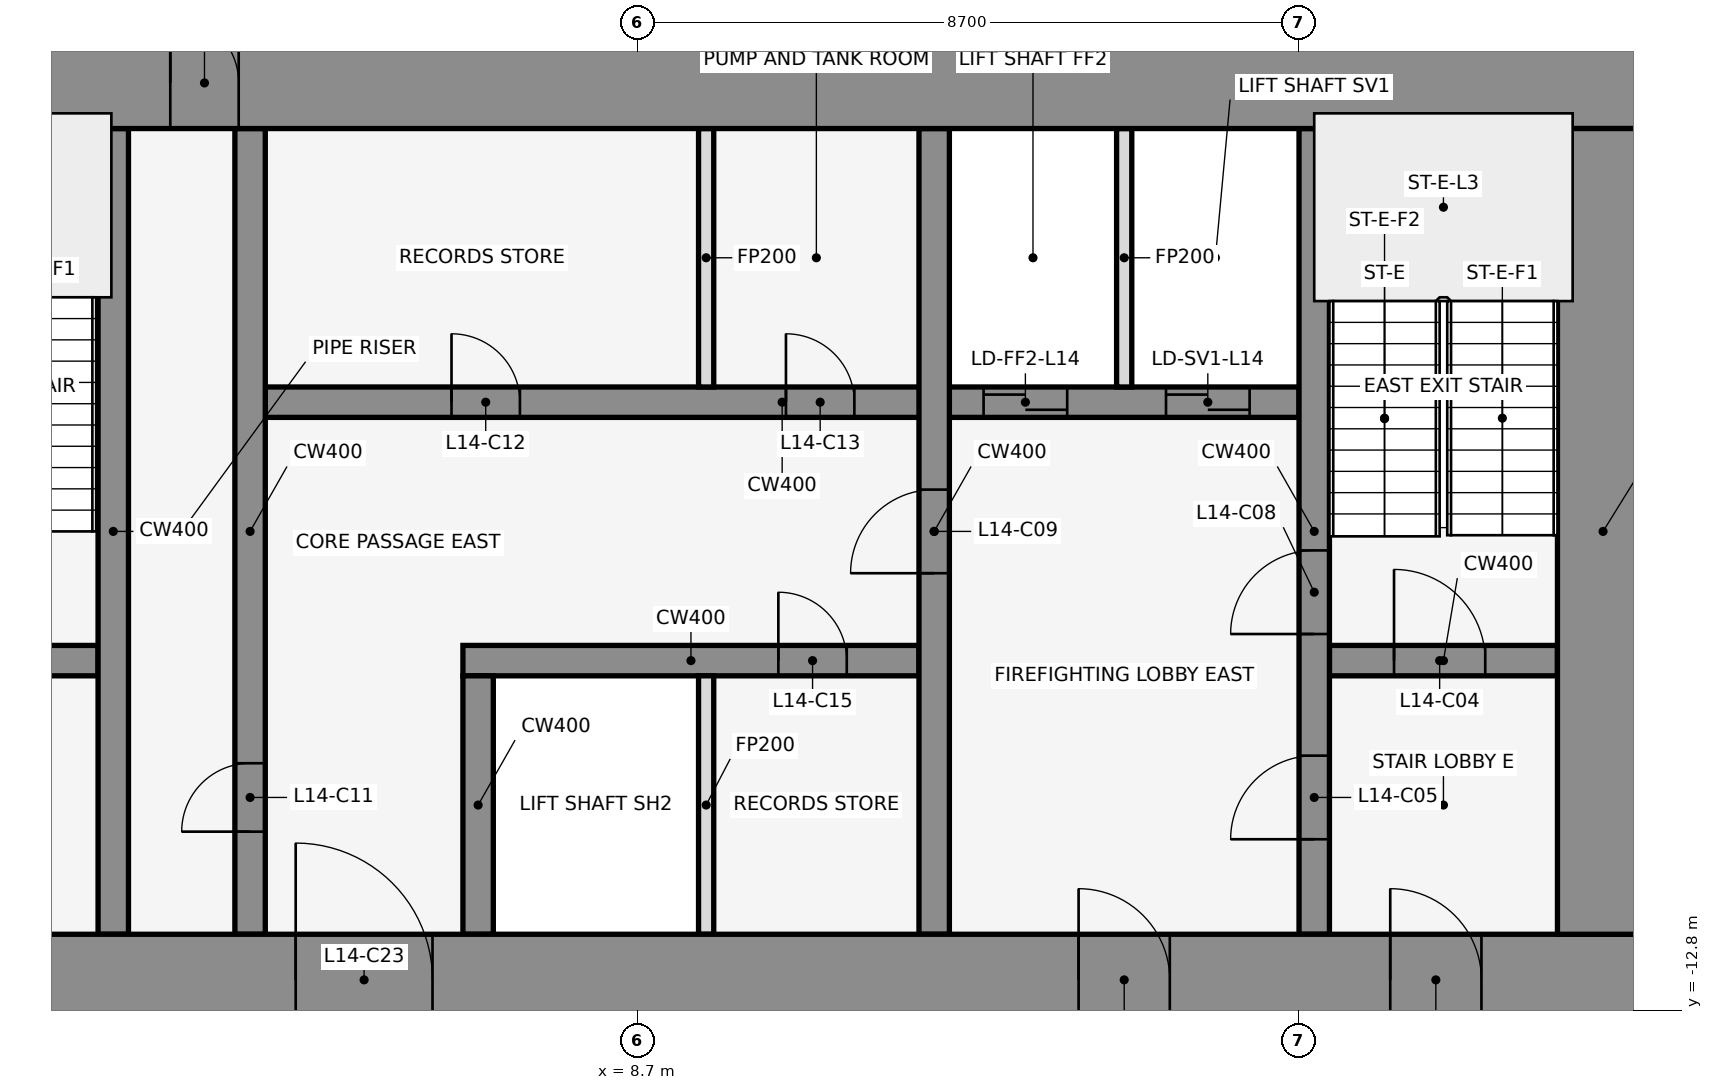
"""IFC4 building model, lengths in metres.
Left out: names, types, materials, properties, quantities, classifications, styles, units other than length and angle.
Written with IfcOpenShell. Run it as: python <this file> out.ifc"""

import sys

from ifc_helpers import new_model, si_unit, direction, frame, frame_2d, origin, place, context, subcontext, project, spatial, rectangle, extrude, element, fill, save


model = new_model("IFC4")
c1 = context("Model", 3, precision=1e-05, world=origin(), true_north=direction((0.0, 1.0)))
c2 = subcontext(c1, "Body", "Model", "MODEL_VIEW")
j1 = project(units=[si_unit("LENGTHUNIT", "METRE"), si_unit("PLANEANGLEUNIT", "RADIAN")], contexts=[c1])
p1 = place(None, origin())
s1 = spatial("IfcSite", under=j1, at=p1, CompositionType="ELEMENT")
p2 = place(p1, origin())
s2 = spatial("IfcBuilding", under=s1, at=p2, CompositionType="ELEMENT")
p3 = place(p2, frame((0.0, 0.0, 71.0)))
s3 = spatial("IfcBuildingStorey", under=s2, at=p3, CompositionType="ELEMENT", Elevation=71.0)
for number, where, z_axis, x_axis in (
    (1, (16.432, -0.105, 0.0), (0.0, 0.0, 1.0), (-0.84, 0.543, 0.0)),
    (2, (1.901, 1.08, 0.0), (0.0, 0.0, 1.0), (-0.84, -0.543, 0.0)),
):
    element("IfcWall", number, at=place(p3, frame(where, z_axis=z_axis, x_axis=x_axis)), inside=s3, PredefinedType="STANDARD", context=c2, shape_type="SweptSolid", body=[
        extrude(rectangle(XDim=2.183, YDim=0.25, at=frame_2d((1.091, 0.0))), origin(), (0.0, 0.0, 1.0), 4.35),
    ])
p4 = place(p3, frame((-1.6, -8.2, 0.0), z_axis=(0.0, 0.0, 1.0), x_axis=(1.0, 0.0, 0.0)))
e3 = element("IfcWall", 3, at=p4, inside=s3, PredefinedType="SHEAR", context=c2, shape_type="SweptSolid", body=[
    extrude(rectangle(XDim=3.2, YDim=0.4, at=frame_2d((1.6, 0.0))), origin(), (0.0, 0.0, 1.0), 4.5),
])
p5 = place(p4, frame((1.05, 0.0, 0.0)))
e4 = element("IfcOpeningElement", 4, at=p5, cuts=e3, PredefinedType="OPENING", context=c2, shape_type="SweptSolid", body=[
    extrude(rectangle(XDim=1.2, YDim=2.1, at=frame_2d((0.6, 1.05))), frame((0.0, 0.212, 0.0), z_axis=(0.0, -1.0, 0.0), x_axis=(1.0, 0.0, 0.0)), (0.0, 0.0, 1.0), 0.424),
])
p6 = place(p3, frame((6.4, -8.2, 0.0), z_axis=(0.0, 0.0, 1.0), x_axis=(1.0, 0.0, 0.0)))
e5 = element("IfcWall", 5, at=p6, inside=s3, PredefinedType="SHEAR", context=c2, shape_type="SweptSolid", body=[
    extrude(rectangle(XDim=6.0, YDim=0.4, at=frame_2d((3.0, 0.0))), origin(), (0.0, 0.0, 1.0), 4.5),
])
p7 = place(p6, frame((4.15, 0.0, 0.0)))
e6 = element("IfcOpeningElement", 6, at=p7, cuts=e5, PredefinedType="OPENING", context=c2, shape_type="SweptSolid", body=[
    extrude(rectangle(XDim=0.9, YDim=2.1, at=frame_2d((0.45, 1.05))), frame((0.0, 0.212, 0.0), z_axis=(0.0, -1.0, 0.0), x_axis=(1.0, 0.0, 0.0)), (0.0, 0.0, 1.0), 0.424),
])
p8 = place(p3, frame((17.8, -8.2, 0.0), z_axis=(0.0, 0.0, 1.0), x_axis=(1.0, 0.0, 0.0)))
e7 = element("IfcWall", 7, at=p8, inside=s3, PredefinedType="SHEAR", context=c2, shape_type="SweptSolid", body=[
    extrude(rectangle(XDim=3.0, YDim=0.4, at=frame_2d((1.5, 0.0))), origin(), (0.0, 0.0, 1.0), 4.5),
])
p9 = place(p8, frame((0.85, 0.0, 0.0)))
e8 = element("IfcOpeningElement", 8, at=p9, cuts=e7, PredefinedType="OPENING", context=c2, shape_type="SweptSolid", body=[
    extrude(rectangle(XDim=1.2, YDim=2.1, at=frame_2d((0.6, 1.05))), frame((0.0, 0.212, 0.0), z_axis=(0.0, -1.0, 0.0), x_axis=(1.0, 0.0, 0.0)), (0.0, 0.0, 1.0), 0.424),
])
p10 = place(p3, frame((3.8, -4.8, 0.0), z_axis=(0.0, 0.0, 1.0), x_axis=(1.0, 0.0, 0.0)))
e9 = element("IfcWall", 9, at=p10, inside=s3, PredefinedType="SHEAR", context=c2, shape_type="SweptSolid", body=[
    extrude(rectangle(XDim=13.6, YDim=0.4, at=frame_2d((6.8, 0.0))), origin(), (0.0, 0.0, 1.0), 4.5),
])
p11 = place(p10, frame((9.45, 0.0, 0.0)))
e10 = element("IfcOpeningElement", 10, at=p11, cuts=e9, PredefinedType="OPENING", context=c2, shape_type="SweptSolid", body=[
    extrude(rectangle(XDim=1.1, YDim=2.1, at=frame_2d((0.55, 1.05))), frame((0.0, 0.212, 0.0), z_axis=(0.0, -1.0, 0.0), x_axis=(1.0, 0.0, 0.0)), (0.0, 0.0, 1.0), 0.424),
])
p12 = place(p10, frame((11.85, 0.0, 0.0)))
e11 = element("IfcOpeningElement", 11, at=p12, cuts=e9, PredefinedType="OPENING", context=c2, shape_type="SweptSolid", body=[
    extrude(rectangle(XDim=1.1, YDim=2.1, at=frame_2d((0.55, 1.05))), frame((0.0, 0.212, 0.0), z_axis=(0.0, -1.0, 0.0), x_axis=(1.0, 0.0, 0.0)), (0.0, 0.0, 1.0), 0.424),
])
p13 = place(p10, frame((2.45, 0.0, 0.0)))
e12 = element("IfcOpeningElement", 12, at=p13, cuts=e9, PredefinedType="OPENING", context=c2, shape_type="SweptSolid", body=[
    extrude(rectangle(XDim=0.9, YDim=2.1, at=frame_2d((0.45, 1.05))), frame((0.0, 0.212, 0.0), z_axis=(0.0, -1.0, 0.0), x_axis=(1.0, 0.0, 0.0)), (0.0, 0.0, 1.0), 0.424),
])
p14 = place(p10, frame((6.85, 0.0, 0.0)))
e13 = element("IfcOpeningElement", 13, at=p14, cuts=e9, PredefinedType="OPENING", context=c2, shape_type="SweptSolid", body=[
    extrude(rectangle(XDim=0.9, YDim=2.1, at=frame_2d((0.45, 1.05))), frame((0.0, 0.212, 0.0), z_axis=(0.0, -1.0, 0.0), x_axis=(1.0, 0.0, 0.0)), (0.0, 0.0, 1.0), 0.424),
])
p15 = place(p3, frame((1.8, -11.8, 0.0), z_axis=(0.0, 0.0, 1.0), x_axis=(0.0, 1.0, 0.0)))
e14 = element("IfcWall", 14, at=p15, inside=s3, PredefinedType="SHEAR", context=c2, shape_type="SweptSolid", body=[
    extrude(rectangle(XDim=10.6, YDim=0.4, at=frame_2d((5.3, 0.0))), origin(), (0.0, 0.0, 1.0), 4.5),
])
p16 = place(p3, frame((3.6, -11.8, 0.0), z_axis=(0.0, 0.0, 1.0), x_axis=(0.0, 1.0, 0.0)))
e15 = element("IfcWall", 15, at=p16, inside=s3, PredefinedType="SHEAR", context=c2, shape_type="SweptSolid", body=[
    extrude(rectangle(XDim=10.6, YDim=0.4, at=frame_2d((5.3, 0.0))), origin(), (0.0, 0.0, 1.0), 4.5),
])
p17 = place(p16, frame((1.35, 0.0, 0.0)))
e16 = element("IfcOpeningElement", 16, at=p17, cuts=e15, PredefinedType="OPENING", context=c2, shape_type="SweptSolid", body=[
    extrude(rectangle(XDim=0.9, YDim=2.1, at=frame_2d((0.45, 1.05))), frame((0.0, 0.212, 0.0), z_axis=(0.0, -1.0, 0.0), x_axis=(1.0, 0.0, 0.0)), (0.0, 0.0, 1.0), 0.424),
])
p18 = place(p3, frame((6.6, -11.8, 0.0), z_axis=(0.0, 0.0, 1.0), x_axis=(0.0, 1.0, 0.0)))
e17 = element("IfcWall", 17, at=p18, inside=s3, PredefinedType="SHEAR", context=c2, shape_type="SweptSolid", body=[
    extrude(rectangle(XDim=3.4, YDim=0.4, at=frame_2d((1.7, 0.0))), origin(), (0.0, 0.0, 1.0), 4.5),
])
for number, where, z_axis, x_axis in (
    (18, (9.6, -11.8, 0.0), (0.0, 0.0, 1.0), (0.0, 1.0, 0.0)),
    (19, (9.6, -4.6, 0.0), (0.0, 0.0, 1.0), (0.0, 1.0, 0.0)),
):
    element("IfcWall", number, at=place(p3, frame(where, z_axis=z_axis, x_axis=x_axis)), inside=s3, PredefinedType="PARTITIONING", context=c2, shape_type="SweptSolid", body=[
        extrude(rectangle(XDim=3.4, YDim=0.2, at=frame_2d((1.7, 0.0))), origin(), (0.0, 0.0, 1.0), 3.418),
    ])
p19 = place(p3, frame((12.6, -11.8, 0.0), z_axis=(0.0, 0.0, 1.0), x_axis=(0.0, 1.0, 0.0)))
e20 = element("IfcWall", 20, at=p19, inside=s3, PredefinedType="SHEAR", context=c2, shape_type="SweptSolid", body=[
    extrude(rectangle(XDim=10.6, YDim=0.4, at=frame_2d((5.3, 0.0))), origin(), (0.0, 0.0, 1.0), 4.5),
])
p20 = place(p19, frame((4.75, 0.0, 0.0)))
e21 = element("IfcOpeningElement", 21, at=p20, cuts=e20, PredefinedType="OPENING", context=c2, shape_type="SweptSolid", body=[
    extrude(rectangle(XDim=1.1, YDim=2.1, at=frame_2d((0.55, 1.05))), frame((0.0, 0.212, 0.0), z_axis=(0.0, -1.0, 0.0), x_axis=(1.0, 0.0, 0.0)), (0.0, 0.0, 1.0), 0.424),
])
p21 = place(p3, frame((15.1, -4.6, 0.0), z_axis=(0.0, 0.0, 1.0), x_axis=(0.0, 1.0, 0.0)))
e22 = element("IfcWall", 22, at=p21, inside=s3, PredefinedType="PARTITIONING", context=c2, shape_type="SweptSolid", body=[
    extrude(rectangle(XDim=3.4, YDim=0.2, at=frame_2d((1.7, 0.0))), origin(), (0.0, 0.0, 1.0), 3.418),
])
p22 = place(p3, frame((17.6, -11.8, 0.0), z_axis=(0.0, 0.0, 1.0), x_axis=(0.0, 1.0, 0.0)))
e23 = element("IfcWall", 23, at=p22, inside=s3, PredefinedType="SHEAR", context=c2, shape_type="SweptSolid", body=[
    extrude(rectangle(XDim=10.6, YDim=0.4, at=frame_2d((5.3, 0.0))), origin(), (0.0, 0.0, 1.0), 4.5),
])
p23 = place(p22, frame((1.25, 0.0, 0.0)))
e24 = element("IfcOpeningElement", 24, at=p23, cuts=e23, PredefinedType="OPENING", context=c2, shape_type="SweptSolid", body=[
    extrude(rectangle(XDim=1.1, YDim=2.1, at=frame_2d((0.55, 1.05))), frame((0.0, 0.212, 0.0), z_axis=(0.0, -1.0, 0.0), x_axis=(1.0, 0.0, 0.0)), (0.0, 0.0, 1.0), 0.424),
])
p24 = place(p22, frame((3.95, 0.0, 0.0)))
e25 = element("IfcOpeningElement", 25, at=p24, cuts=e23, PredefinedType="OPENING", context=c2, shape_type="SweptSolid", body=[
    extrude(rectangle(XDim=1.1, YDim=2.1, at=frame_2d((0.55, 1.05))), frame((0.0, 0.212, 0.0), z_axis=(0.0, -1.0, 0.0), x_axis=(1.0, 0.0, 0.0)), (0.0, 0.0, 1.0), 0.424),
])
p25 = place(p3, frame((-22.0, -0.6, 0.0), z_axis=(0.0, 0.0, 1.0), x_axis=(1.0, 0.0, 0.0)))
e26 = element("IfcWall", 26, at=p25, inside=s3, PredefinedType="SHEAR", context=c2, shape_type="SweptSolid", body=[
    extrude(rectangle(XDim=44.0, YDim=1.2, at=frame_2d((22.0, 0.0))), origin(), (0.0, 0.0, 1.0), 4.5),
])
p26 = place(p25, frame((18.55, 0.0, 0.0)))
e27 = element("IfcOpeningElement", 27, at=p26, cuts=e26, PredefinedType="OPENING", context=c2, shape_type="SweptSolid", body=[
    extrude(rectangle(XDim=0.9, YDim=2.1, at=frame_2d((0.45, 1.05))), frame((0.0, 0.612, 0.0), z_axis=(0.0, -1.0, 0.0), x_axis=(1.0, 0.0, 0.0)), (0.0, 0.0, 1.0), 1.224),
])
p27 = place(p25, frame((24.55, 0.0, 0.0)))
e28 = element("IfcOpeningElement", 28, at=p27, cuts=e26, PredefinedType="OPENING", context=c2, shape_type="SweptSolid", body=[
    extrude(rectangle(XDim=0.9, YDim=2.1, at=frame_2d((0.45, 1.05))), frame((0.0, 0.612, 0.0), z_axis=(0.0, -1.0, 0.0), x_axis=(1.0, 0.0, 0.0)), (0.0, 0.0, 1.0), 1.224),
])
p28 = place(p3, frame((-22.0, -12.4, 0.0), z_axis=(0.0, 0.0, 1.0), x_axis=(1.0, 0.0, 0.0)))
e29 = element("IfcWall", 29, at=p28, inside=s3, PredefinedType="SHEAR", context=c2, shape_type="SweptSolid", body=[
    extrude(rectangle(XDim=44.0, YDim=1.2, at=frame_2d((22.0, 0.0))), origin(), (0.0, 0.0, 1.0), 4.5),
])
p29 = place(p28, frame((2.2, 0.0, 0.0)))
e30 = element("IfcOpeningElement", 30, at=p29, cuts=e29, PredefinedType="OPENING", context=c2, shape_type="SweptSolid", body=[
    extrude(rectangle(XDim=1.2, YDim=2.1, at=frame_2d((0.6, 1.05))), frame((0.0, 0.612, 0.0), z_axis=(0.0, -1.0, 0.0), x_axis=(1.0, 0.0, 0.0)), (0.0, 0.0, 1.0), 1.224),
])
p30 = place(p28, frame((21.4, 0.0, 0.0)))
e31 = element("IfcOpeningElement", 31, at=p30, cuts=e29, PredefinedType="OPENING", context=c2, shape_type="SweptSolid", body=[
    extrude(rectangle(XDim=1.2, YDim=2.1, at=frame_2d((0.6, 1.05))), frame((0.0, 0.612, 0.0), z_axis=(0.0, -1.0, 0.0), x_axis=(1.0, 0.0, 0.0)), (0.0, 0.0, 1.0), 1.224),
])
p31 = place(p28, frame((40.6, 0.0, 0.0)))
e32 = element("IfcOpeningElement", 32, at=p31, cuts=e29, PredefinedType="OPENING", context=c2, shape_type="SweptSolid", body=[
    extrude(rectangle(XDim=1.2, YDim=2.1, at=frame_2d((0.6, 1.05))), frame((0.0, 0.612, 0.0), z_axis=(0.0, -1.0, 0.0), x_axis=(1.0, 0.0, 0.0)), (0.0, 0.0, 1.0), 1.224),
])
p32 = place(p28, frame((16.0, 0.0, 0.0)))
e33 = element("IfcOpeningElement", 33, at=p32, cuts=e29, PredefinedType="OPENING", context=c2, shape_type="SweptSolid", body=[
    extrude(rectangle(XDim=1.8, YDim=2.1, at=frame_2d((0.9, 1.05))), frame((0.0, 0.612, 0.0), z_axis=(0.0, -1.0, 0.0), x_axis=(1.0, 0.0, 0.0)), (0.0, 0.0, 1.0), 1.224),
])
p33 = place(p28, frame((6.3, 0.0, 0.0)))
e34 = element("IfcOpeningElement", 34, at=p33, cuts=e29, PredefinedType="OPENING", context=c2, shape_type="SweptSolid", body=[
    extrude(rectangle(XDim=1.2, YDim=2.1, at=frame_2d((0.6, 1.05))), frame((0.0, 0.612, 0.0), z_axis=(0.0, -1.0, 0.0), x_axis=(1.0, 0.0, 0.0)), (0.0, 0.0, 1.0), 1.224),
])
p34 = place(p28, frame((26.2, 0.0, 0.0)))
e35 = element("IfcOpeningElement", 35, at=p34, cuts=e29, PredefinedType="OPENING", context=c2, shape_type="SweptSolid", body=[
    extrude(rectangle(XDim=1.8, YDim=2.1, at=frame_2d((0.9, 1.05))), frame((0.0, 0.612, 0.0), z_axis=(0.0, -1.0, 0.0), x_axis=(1.0, 0.0, 0.0)), (0.0, 0.0, 1.0), 1.224),
])
p35 = place(p28, frame((36.5, 0.0, 0.0)))
e36 = element("IfcOpeningElement", 36, at=p35, cuts=e29, PredefinedType="OPENING", context=c2, shape_type="SweptSolid", body=[
    extrude(rectangle(XDim=1.2, YDim=2.1, at=frame_2d((0.6, 1.05))), frame((0.0, 0.612, 0.0), z_axis=(0.0, -1.0, 0.0), x_axis=(1.0, 0.0, 0.0)), (0.0, 0.0, 1.0), 1.224),
])
p36 = place(p3, frame((21.4, -11.8, 0.0), z_axis=(0.0, 0.0, 1.0), x_axis=(0.0, 1.0, 0.0)))
e37 = element("IfcWall", 37, at=p36, inside=s3, PredefinedType="SHEAR", context=c2, shape_type="SweptSolid", body=[
    extrude(rectangle(XDim=10.6, YDim=1.2, at=frame_2d((5.3, 0.0))), origin(), (0.0, 0.0, 1.0), 4.5),
])
p37 = place(p9, origin())
e38 = element("IfcDoor", 38, at=p37, inside=s3, OperationType="SINGLE_SWING_RIGHT", PredefinedType="DOOR", context=c2, shape_type="SweptSolid", body=[
    extrude(rectangle(XDim=1.2, YDim=2.1, at=frame_2d((0.6, 1.05))), frame((0.0, 0.025, 0.0), z_axis=(0.0, -1.0, 0.0), x_axis=(1.0, 0.0, 0.0)), (0.0, 0.0, 1.0), 0.05),
])
fill(e8, e38)
p38 = place(p23, origin())
e39 = element("IfcDoor", 39, at=p38, inside=s3, OperationType="SINGLE_SWING_LEFT", PredefinedType="DOOR", context=c2, shape_type="SweptSolid", body=[
    extrude(rectangle(XDim=1.1, YDim=2.1, at=frame_2d((0.55, 1.05))), frame((0.0, 0.025, 0.0), z_axis=(0.0, -1.0, 0.0), x_axis=(1.0, 0.0, 0.0)), (0.0, 0.0, 1.0), 0.05),
])
fill(e24, e39)
p39 = place(p11, origin())
e40 = element("IfcDoor", 40, at=p39, inside=s3, OperationType="DOUBLE_DOOR_SLIDING", PredefinedType="DOOR", context=c2, shape_type="SweptSolid", body=[
    extrude(rectangle(XDim=1.1, YDim=2.1, at=frame_2d((0.55, 1.05))), frame((0.0, 0.025, 0.0), z_axis=(0.0, -1.0, 0.0), x_axis=(1.0, 0.0, 0.0)), (0.0, 0.0, 1.0), 0.05),
])
fill(e10, e40)
p40 = place(p12, origin())
e41 = element("IfcDoor", 41, at=p40, inside=s3, OperationType="DOUBLE_DOOR_SLIDING", PredefinedType="DOOR", context=c2, shape_type="SweptSolid", body=[
    extrude(rectangle(XDim=1.1, YDim=2.1, at=frame_2d((0.55, 1.05))), frame((0.0, 0.025, 0.0), z_axis=(0.0, -1.0, 0.0), x_axis=(1.0, 0.0, 0.0)), (0.0, 0.0, 1.0), 0.05),
])
fill(e11, e41)
p41 = place(p24, origin())
e42 = element("IfcDoor", 42, at=p41, inside=s3, OperationType="SINGLE_SWING_RIGHT", PredefinedType="DOOR", context=c2, shape_type="SweptSolid", body=[
    extrude(rectangle(XDim=1.1, YDim=2.1, at=frame_2d((0.55, 1.05))), frame((0.0, 0.025, 0.0), z_axis=(0.0, -1.0, 0.0), x_axis=(1.0, 0.0, 0.0)), (0.0, 0.0, 1.0), 0.05),
])
fill(e25, e42)
p42 = place(p20, frame((1.1, 0.0, 0.0), z_axis=(0.0, 0.0, 1.0), x_axis=(-1.0, 0.0, 0.0)))
e43 = element("IfcDoor", 43, at=p42, inside=s3, OperationType="SINGLE_SWING_RIGHT", PredefinedType="DOOR", context=c2, shape_type="SweptSolid", body=[
    extrude(rectangle(XDim=1.1, YDim=2.1, at=frame_2d((0.55, 1.05))), frame((0.0, 0.025, 0.0), z_axis=(0.0, -1.0, 0.0), x_axis=(1.0, 0.0, 0.0)), (0.0, 0.0, 1.0), 0.05),
])
fill(e21, e43)
p43 = place(p17, origin())
e44 = element("IfcDoor", 44, at=p43, inside=s3, OperationType="SINGLE_SWING_LEFT", PredefinedType="DOOR", context=c2, shape_type="SweptSolid", body=[
    extrude(rectangle(XDim=0.9, YDim=2.1, at=frame_2d((0.45, 1.05))), frame((0.0, 0.025, 0.0), z_axis=(0.0, -1.0, 0.0), x_axis=(1.0, 0.0, 0.0)), (0.0, 0.0, 1.0), 0.05),
])
fill(e16, e44)
p44 = place(p13, origin())
e45 = element("IfcDoor", 45, at=p44, inside=s3, OperationType="SINGLE_SWING_RIGHT", PredefinedType="DOOR", context=c2, shape_type="SweptSolid", body=[
    extrude(rectangle(XDim=0.9, YDim=2.1, at=frame_2d((0.45, 1.05))), frame((0.0, 0.025, 0.0), z_axis=(0.0, -1.0, 0.0), x_axis=(1.0, 0.0, 0.0)), (0.0, 0.0, 1.0), 0.05),
])
fill(e12, e45)
p45 = place(p14, origin())
e46 = element("IfcDoor", 46, at=p45, inside=s3, OperationType="SINGLE_SWING_LEFT", PredefinedType="DOOR", context=c2, shape_type="SweptSolid", body=[
    extrude(rectangle(XDim=0.9, YDim=2.1, at=frame_2d((0.45, 1.05))), frame((0.0, 0.025, 0.0), z_axis=(0.0, -1.0, 0.0), x_axis=(1.0, 0.0, 0.0)), (0.0, 0.0, 1.0), 0.05),
])
fill(e13, e46)
p46 = place(p7, frame((0.9, 0.0, 0.0), z_axis=(0.0, 0.0, 1.0), x_axis=(-1.0, 0.0, 0.0)))
e47 = element("IfcDoor", 47, at=p46, inside=s3, OperationType="SINGLE_SWING_RIGHT", PredefinedType="DOOR", context=c2, shape_type="SweptSolid", body=[
    extrude(rectangle(XDim=0.9, YDim=2.1, at=frame_2d((0.45, 1.05))), frame((0.0, 0.025, 0.0), z_axis=(0.0, -1.0, 0.0), x_axis=(1.0, 0.0, 0.0)), (0.0, 0.0, 1.0), 0.05),
])
fill(e6, e47)
p47 = place(p27, origin())
e48 = element("IfcDoor", 48, at=p47, inside=s3, OperationType="SINGLE_SWING_LEFT", PredefinedType="DOOR", context=c2, shape_type="SweptSolid", body=[
    extrude(rectangle(XDim=0.9, YDim=2.1, at=frame_2d((0.45, 1.05))), frame((0.0, 0.025, 0.0), z_axis=(0.0, -1.0, 0.0), x_axis=(1.0, 0.0, 0.0)), (0.0, 0.0, 1.0), 0.05),
])
fill(e28, e48)
p48 = place(p31, frame((1.2, 0.0, 0.0), z_axis=(0.0, 0.0, 1.0), x_axis=(-1.0, 0.0, 0.0)))
e49 = element("IfcDoor", 49, at=p48, inside=s3, OperationType="SINGLE_SWING_RIGHT", PredefinedType="DOOR", context=c2, shape_type="SweptSolid", body=[
    extrude(rectangle(XDim=1.2, YDim=2.1, at=frame_2d((0.6, 1.05))), frame((0.0, 0.025, 0.0), z_axis=(0.0, -1.0, 0.0), x_axis=(1.0, 0.0, 0.0)), (0.0, 0.0, 1.0), 0.05),
])
fill(e32, e49)
p49 = place(p34, origin())
e50 = element("IfcDoor", 50, at=p49, inside=s3, OperationType="SINGLE_SWING_LEFT", PredefinedType="DOOR", context=c2, shape_type="SweptSolid", body=[
    extrude(rectangle(XDim=1.8, YDim=2.1, at=frame_2d((0.9, 1.05))), frame((0.0, 0.025, 0.0), z_axis=(0.0, -1.0, 0.0), x_axis=(1.0, 0.0, 0.0)), (0.0, 0.0, 1.0), 0.05),
])
fill(e35, e50)
p50 = place(p35, frame((1.2, 0.0, 0.0), z_axis=(0.0, 0.0, 1.0), x_axis=(-1.0, 0.0, 0.0)))
e51 = element("IfcDoor", 51, at=p50, inside=s3, OperationType="SINGLE_SWING_RIGHT", PredefinedType="DOOR", context=c2, shape_type="SweptSolid", body=[
    extrude(rectangle(XDim=1.2, YDim=2.1, at=frame_2d((0.6, 1.05))), frame((0.0, 0.025, 0.0), z_axis=(0.0, -1.0, 0.0), x_axis=(1.0, 0.0, 0.0)), (0.0, 0.0, 1.0), 0.05),
])
fill(e36, e51)
save(model, sys.argv[1])
